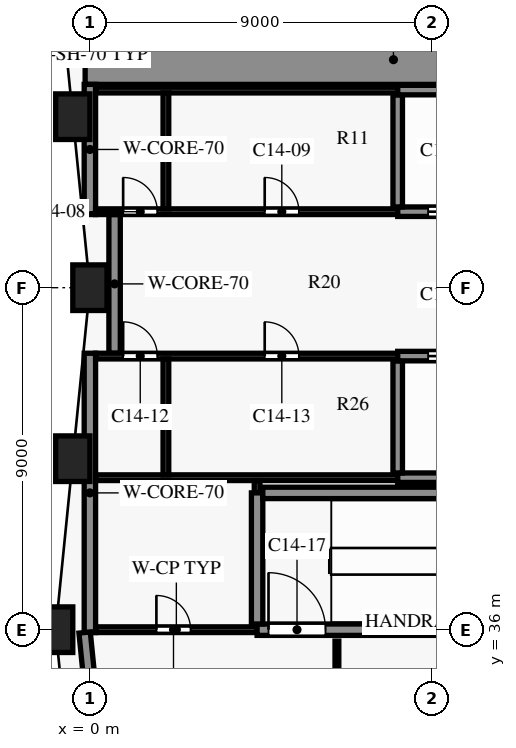
"""IFC4 building model, lengths in metres.
Left out: names, types, materials, properties, quantities, classifications, styles, units other than length and angle.
Written with IfcOpenShell. Run it as: python <this file> out.ifc"""

import sys

from ifc_helpers import new_model, si_unit, direction, frame, frame_2d, origin, origin_2d, place, context, subcontext, project, spatial, rectangle, extrude, element, fill, save


model = new_model("IFC4")
c1 = context("Model", 3, precision=1e-05, world=origin(), true_north=direction((0.0, 1.0)))
c2 = subcontext(c1, "Body", "Model", "MODEL_VIEW")
j1 = project(units=[si_unit("LENGTHUNIT", "METRE"), si_unit("PLANEANGLEUNIT", "RADIAN")], contexts=[c1])
p1 = place(None, origin())
s1 = spatial("IfcSite", under=j1, at=p1, CompositionType="ELEMENT")
p2 = place(p1, origin())
s2 = spatial("IfcBuilding", under=s1, at=p2, CompositionType="ELEMENT")
p3 = place(p2, frame((0.0, 0.0, 92.3)))
s3 = spatial("IfcBuildingStorey", under=s2, at=p3, CompositionType="ELEMENT", Elevation=92.3)
for number, where, z_axis, x_axis in (
    (1, (-0.45, 49.5, 0.0), (0.0, 0.0, 1.0), (0.1, -0.995, 0.0)),
    (2, (0.0, 45.0, 0.0), (0.0, 0.0, 1.0), (0.0, -1.0, 0.0)),
    (3, (-0.45, 40.5, 0.0), (0.0, 0.0, 1.0), (-0.1, -0.995, 0.0)),
    (4, (-0.9, 36.0, 0.0), (0.0, 0.0, 1.0), (0.0, -1.0, 0.0)),
):
    element("IfcColumn", number, at=place(p3, frame(where, z_axis=z_axis, x_axis=x_axis)), inside=s3, PredefinedType="COLUMN", context=c2, shape_type="SweptSolid", body=[
        extrude(rectangle(XDim=0.9, YDim=1.2, at=origin_2d()), origin(), (0.0, 0.0, 1.0), 3.8),
    ])
p4 = place(p3, frame((0.755, 26.985, 0.0), z_axis=(0.0, 0.0, 1.0), x_axis=(-0.099479505633, 0.995039611251, 0.0)))
e5 = element("IfcWall", 5, at=p4, inside=s3, PredefinedType="SOLIDWALL", context=c2, shape_type="SweptSolid", body=[
    extrude(rectangle(XDim=8.985, YDim=0.3, at=frame_2d((4.492, 0.0))), origin(), (0.0, 0.0, 1.0), 3.15),
])
p5 = place(p4, frame((0.701, 0.0, 0.15)))
e6 = element("IfcOpeningElement", 6, at=p5, cuts=e5, PredefinedType="OPENING", context=c2, shape_type="SweptSolid", body=[
    extrude(rectangle(XDim=3.3, YDim=2.4, at=frame_2d((1.65, 1.2))), frame((0.0, 0.16, 0.0), z_axis=(0.0, -1.0, 0.0), x_axis=(1.0, 0.0, 0.0)), (0.0, 0.0, 1.0), 0.32),
])
p6 = place(p4, frame((5.974, 0.0, 0.75)))
e7 = element("IfcOpeningElement", 7, at=p6, cuts=e5, PredefinedType="OPENING", context=c2, shape_type="SweptSolid", body=[
    extrude(rectangle(XDim=1.8, YDim=1.8, at=frame_2d((0.9, 0.9))), frame((0.0, 0.16, 0.0), z_axis=(0.0, -1.0, 0.0), x_axis=(1.0, 0.0, 0.0)), (0.0, 0.0, 1.0), 0.32),
])
p7 = place(p3, frame((0.15, 36.0, 0.0), z_axis=(0.0, 0.0, 1.0), x_axis=(1.0, 0.0, 0.0)))
e8 = element("IfcWall", 8, at=p7, inside=s3, PredefinedType="PARTITIONING", context=c2, shape_type="SweptSolid", body=[
    extrude(rectangle(XDim=4.25, YDim=0.15, at=frame_2d((2.125, 0.0))), origin(), (0.0, 0.0, 1.0), 3.5),
])
p8 = place(p7, frame((1.6, 0.0, 0.0)))
e9 = element("IfcOpeningElement", 9, at=p8, cuts=e8, PredefinedType="OPENING", context=c2, shape_type="SweptSolid", body=[
    extrude(rectangle(XDim=0.9, YDim=2.1, at=frame_2d((0.45, 1.05))), frame((0.0, 0.085, 0.0), z_axis=(0.0, -1.0, 0.0), x_axis=(1.0, 0.0, 0.0)), (0.0, 0.0, 1.0), 0.17),
])
p9 = place(p3, frame((4.4, 36.0, 0.0), z_axis=(0.0, 0.0, 1.0), x_axis=(1.0, 0.0, 0.0)))
e10 = element("IfcWall", 10, at=p9, inside=s3, PredefinedType="SHEAR", context=c2, shape_type="SweptSolid", body=[
    extrude(rectangle(XDim=8.0, YDim=0.3, at=frame_2d((4.0, 0.0))), origin(), (0.0, 0.0, 1.0), 3.5),
])
p10 = place(p9, frame((0.3, 0.0, 0.0)))
e11 = element("IfcOpeningElement", 11, at=p10, cuts=e10, PredefinedType="OPENING", context=c2, shape_type="SweptSolid", body=[
    extrude(rectangle(XDim=1.5, YDim=2.2, at=frame_2d((0.75, 1.1))), frame((0.0, 0.16, 0.0), z_axis=(0.0, -1.0, 0.0), x_axis=(1.0, 0.0, 0.0)), (0.0, 0.0, 1.0), 0.32),
])
p11 = place(p3, frame((4.55, 39.6, 0.0), z_axis=(0.0, 0.0, 1.0), x_axis=(1.0, 0.0, 0.0)))
e12 = element("IfcWall", 12, at=p11, inside=s3, PredefinedType="SHEAR", context=c2, shape_type="SweptSolid", body=[
    extrude(rectangle(XDim=7.7, YDim=0.3, at=frame_2d((3.85, 0.0))), origin(), (0.0, 0.0, 1.0), 3.5),
])
p12 = place(p3, frame((0.15, 40.0, 0.0), z_axis=(0.0, 0.0, 1.0), x_axis=(1.0, 0.0, 0.0)))
e13 = element("IfcWall", 13, at=p12, inside=s3, PredefinedType="PARTITIONING", context=c2, shape_type="SweptSolid", body=[
    extrude(rectangle(XDim=7.95, YDim=0.15, at=frame_2d((3.975, 0.0))), origin(), (0.0, 0.0, 1.0), 3.5),
])
p13 = place(p3, frame((8.1, 40.0, 0.0), z_axis=(0.0, 0.0, 1.0), x_axis=(1.0, 0.0, 0.0)))
e14 = element("IfcWall", 14, at=p13, inside=s3, PredefinedType="SHEAR", context=c2, shape_type="SweptSolid", body=[
    extrude(rectangle(XDim=13.5, YDim=0.25, at=frame_2d((6.75, 0.0))), origin(), (0.0, 0.0, 1.0), 3.5),
])
p14 = place(p3, frame((0.15, 43.2, 0.0), z_axis=(0.0, 0.0, 1.0), x_axis=(1.0, 0.0, 0.0)))
e15 = element("IfcWall", 15, at=p14, inside=s3, PredefinedType="PARTITIONING", context=c2, shape_type="SweptSolid", body=[
    extrude(rectangle(XDim=7.95, YDim=0.15, at=frame_2d((3.975, 0.0))), origin(), (0.0, 0.0, 1.0), 3.5),
])
p15 = place(p14, frame((0.725, 0.0, 0.0)))
e16 = element("IfcOpeningElement", 16, at=p15, cuts=e15, PredefinedType="OPENING", context=c2, shape_type="SweptSolid", body=[
    extrude(rectangle(XDim=0.9, YDim=2.1, at=frame_2d((0.45, 1.05))), frame((0.0, 0.085, 0.0), z_axis=(0.0, -1.0, 0.0), x_axis=(1.0, 0.0, 0.0)), (0.0, 0.0, 1.0), 0.17),
])
p16 = place(p14, frame((4.45, 0.0, 0.0)))
e17 = element("IfcOpeningElement", 17, at=p16, cuts=e15, PredefinedType="OPENING", context=c2, shape_type="SweptSolid", body=[
    extrude(rectangle(XDim=0.9, YDim=2.1, at=frame_2d((0.45, 1.05))), frame((0.0, 0.085, 0.0), z_axis=(0.0, -1.0, 0.0), x_axis=(1.0, 0.0, 0.0)), (0.0, 0.0, 1.0), 0.17),
])
p17 = place(p3, frame((8.1, 43.2, 0.0), z_axis=(0.0, 0.0, 1.0), x_axis=(1.0, 0.0, 0.0)))
e18 = element("IfcWall", 18, at=p17, inside=s3, PredefinedType="SHEAR", context=c2, shape_type="SweptSolid", body=[
    extrude(rectangle(XDim=13.5, YDim=0.25, at=frame_2d((6.75, 0.0))), origin(), (0.0, 0.0, 1.0), 3.5),
])
p18 = place(p17, frame((0.8, 0.0, 0.0)))
e19 = element("IfcOpeningElement", 19, at=p18, cuts=e18, PredefinedType="OPENING", context=c2, shape_type="SweptSolid", body=[
    extrude(rectangle(XDim=1.1, YDim=2.1, at=frame_2d((0.55, 1.05))), frame((0.0, 0.135, 0.0), z_axis=(0.0, -1.0, 0.0), x_axis=(1.0, 0.0, 0.0)), (0.0, 0.0, 1.0), 0.27),
])
p19 = place(p17, frame((3.5, 0.0, 0.0)))
e20 = element("IfcOpeningElement", 20, at=p19, cuts=e18, PredefinedType="OPENING", context=c2, shape_type="SweptSolid", body=[
    extrude(rectangle(XDim=1.1, YDim=2.1, at=frame_2d((0.55, 1.05))), frame((0.0, 0.135, 0.0), z_axis=(0.0, -1.0, 0.0), x_axis=(1.0, 0.0, 0.0)), (0.0, 0.0, 1.0), 0.27),
])
p20 = place(p17, frame((6.2, 0.0, 0.0)))
e21 = element("IfcOpeningElement", 21, at=p20, cuts=e18, PredefinedType="OPENING", context=c2, shape_type="SweptSolid", body=[
    extrude(rectangle(XDim=1.1, YDim=2.1, at=frame_2d((0.55, 1.05))), frame((0.0, 0.135, 0.0), z_axis=(0.0, -1.0, 0.0), x_axis=(1.0, 0.0, 0.0)), (0.0, 0.0, 1.0), 0.27),
])
p21 = place(p17, frame((8.9, 0.0, 0.0)))
e22 = element("IfcOpeningElement", 22, at=p21, cuts=e18, PredefinedType="OPENING", context=c2, shape_type="SweptSolid", body=[
    extrude(rectangle(XDim=1.1, YDim=2.1, at=frame_2d((0.55, 1.05))), frame((0.0, 0.135, 0.0), z_axis=(0.0, -1.0, 0.0), x_axis=(1.0, 0.0, 0.0)), (0.0, 0.0, 1.0), 0.27),
])
p22 = place(p17, frame((11.6, 0.0, 0.0)))
e23 = element("IfcOpeningElement", 23, at=p22, cuts=e18, PredefinedType="OPENING", context=c2, shape_type="SweptSolid", body=[
    extrude(rectangle(XDim=1.1, YDim=2.1, at=frame_2d((0.55, 1.05))), frame((0.0, 0.135, 0.0), z_axis=(0.0, -1.0, 0.0), x_axis=(1.0, 0.0, 0.0)), (0.0, 0.0, 1.0), 0.27),
])
p23 = place(p3, frame((0.15, 47.0, 0.0), z_axis=(0.0, 0.0, 1.0), x_axis=(1.0, 0.0, 0.0)))
e24 = element("IfcWall", 24, at=p23, inside=s3, PredefinedType="PARTITIONING", context=c2, shape_type="SweptSolid", body=[
    extrude(rectangle(XDim=7.95, YDim=0.15, at=frame_2d((3.975, 0.0))), origin(), (0.0, 0.0, 1.0), 3.5),
])
p24 = place(p23, frame((0.725, 0.0, 0.0)))
e25 = element("IfcOpeningElement", 25, at=p24, cuts=e24, PredefinedType="OPENING", context=c2, shape_type="SweptSolid", body=[
    extrude(rectangle(XDim=0.9, YDim=2.1, at=frame_2d((0.45, 1.05))), frame((0.0, 0.085, 0.0), z_axis=(0.0, -1.0, 0.0), x_axis=(1.0, 0.0, 0.0)), (0.0, 0.0, 1.0), 0.17),
])
p25 = place(p23, frame((4.45, 0.0, 0.0)))
e26 = element("IfcOpeningElement", 26, at=p25, cuts=e24, PredefinedType="OPENING", context=c2, shape_type="SweptSolid", body=[
    extrude(rectangle(XDim=0.9, YDim=2.1, at=frame_2d((0.45, 1.05))), frame((0.0, 0.085, 0.0), z_axis=(0.0, -1.0, 0.0), x_axis=(1.0, 0.0, 0.0)), (0.0, 0.0, 1.0), 0.17),
])
p26 = place(p3, frame((8.1, 47.0, 0.0), z_axis=(0.0, 0.0, 1.0), x_axis=(1.0, 0.0, 0.0)))
e27 = element("IfcWall", 27, at=p26, inside=s3, PredefinedType="SHEAR", context=c2, shape_type="SweptSolid", body=[
    extrude(rectangle(XDim=8.1, YDim=0.25, at=frame_2d((4.05, 0.0))), origin(), (0.0, 0.0, 1.0), 3.5),
])
p27 = place(p26, frame((0.8, 0.0, 0.0)))
e28 = element("IfcOpeningElement", 28, at=p27, cuts=e27, PredefinedType="OPENING", context=c2, shape_type="SweptSolid", body=[
    extrude(rectangle(XDim=1.1, YDim=2.1, at=frame_2d((0.55, 1.05))), frame((0.0, 0.135, 0.0), z_axis=(0.0, -1.0, 0.0), x_axis=(1.0, 0.0, 0.0)), (0.0, 0.0, 1.0), 0.27),
])
p28 = place(p26, frame((3.5, 0.0, 0.0)))
e29 = element("IfcOpeningElement", 29, at=p28, cuts=e27, PredefinedType="OPENING", context=c2, shape_type="SweptSolid", body=[
    extrude(rectangle(XDim=1.1, YDim=2.1, at=frame_2d((0.55, 1.05))), frame((0.0, 0.135, 0.0), z_axis=(0.0, -1.0, 0.0), x_axis=(1.0, 0.0, 0.0)), (0.0, 0.0, 1.0), 0.27),
])
p29 = place(p26, frame((6.2, 0.0, 0.0)))
e30 = element("IfcOpeningElement", 30, at=p29, cuts=e27, PredefinedType="OPENING", context=c2, shape_type="SweptSolid", body=[
    extrude(rectangle(XDim=1.1, YDim=2.1, at=frame_2d((0.55, 1.05))), frame((0.0, 0.135, 0.0), z_axis=(0.0, -1.0, 0.0), x_axis=(1.0, 0.0, 0.0)), (0.0, 0.0, 1.0), 0.27),
])
p30 = place(p3, frame((0.15, 50.2, 0.0), z_axis=(0.0, 0.0, 1.0), x_axis=(1.0, 0.0, 0.0)))
e31 = element("IfcWall", 31, at=p30, inside=s3, PredefinedType="PARTITIONING", context=c2, shape_type="SweptSolid", body=[
    extrude(rectangle(XDim=7.95, YDim=0.15, at=frame_2d((3.975, 0.0))), origin(), (0.0, 0.0, 1.0), 3.5),
])
p31 = place(p3, frame((8.1, 50.2, 0.0), z_axis=(0.0, 0.0, 1.0), x_axis=(1.0, 0.0, 0.0)))
e32 = element("IfcWall", 32, at=p31, inside=s3, PredefinedType="SHEAR", context=c2, shape_type="SweptSolid", body=[
    extrude(rectangle(XDim=7.975, YDim=0.25, at=frame_2d((3.987, 0.0))), origin(), (0.0, 0.0, 1.0), 3.5),
])
p32 = place(p3, frame((-0.125, 51.0, 0.0), z_axis=(0.0, 0.0, 1.0), x_axis=(1.0, 0.0, 0.0)))
e33 = element("IfcWall", 33, at=p32, inside=s3, PredefinedType="SHEAR", context=c2, shape_type="SweptSolid", body=[
    extrude(rectangle(XDim=16.225, YDim=1.3, at=frame_2d((8.113, 0.0))), origin(), (0.0, 0.0, 1.0), 3.5),
])
p33 = place(p3, frame((0.0, 35.925, 0.0), z_axis=(0.0, 0.0, 1.0), x_axis=(0.0, 1.0, 0.0)))
e34 = element("IfcWall", 34, at=p33, inside=s3, PredefinedType="SHEAR", context=c2, shape_type="SweptSolid", body=[
    extrude(rectangle(XDim=7.35, YDim=0.3, at=frame_2d((3.675, 0.0))), origin(), (0.0, 0.0, 1.0), 3.5),
])
p34 = place(p3, frame((0.0, 46.925, 0.0), z_axis=(0.0, 0.0, 1.0), x_axis=(0.0, 1.0, 0.0)))
e35 = element("IfcWall", 35, at=p34, inside=s3, PredefinedType="SHEAR", context=c2, shape_type="SweptSolid", body=[
    extrude(rectangle(XDim=3.425, YDim=0.3, at=frame_2d((1.712, 0.0))), origin(), (0.0, 0.0, 1.0), 3.5),
])
p35 = place(p3, frame((0.65, 43.275, 0.0), z_axis=(0.0, 0.0, 1.0), x_axis=(0.0, 1.0, 0.0)))
e36 = element("IfcWall", 36, at=p35, inside=s3, PredefinedType="SHEAR", context=c2, shape_type="SweptSolid", body=[
    extrude(rectangle(XDim=3.65, YDim=0.3, at=frame_2d((1.825, 0.0))), origin(), (0.0, 0.0, 1.0), 3.5),
])
for number, where, z_axis, x_axis in (
    (37, (2.0, 40.075, 0.0), (0.0, 0.0, 1.0), (0.0, 1.0, 0.0)),
    (38, (2.0, 47.075, 0.0), (0.0, 0.0, 1.0), (0.0, 1.0, 0.0)),
):
    element("IfcWall", number, at=place(p3, frame(where, z_axis=z_axis, x_axis=x_axis)), inside=s3, PredefinedType="PARTITIONING", context=c2, shape_type="SweptSolid", body=[
        extrude(rectangle(XDim=3.05, YDim=0.15, at=frame_2d((1.525, 0.0))), origin(), (0.0, 0.0, 1.0), 3.5),
    ])
p36 = place(p3, frame((4.4, 39.6, 0.0), z_axis=(0.0, 0.0, 1.0), x_axis=(0.0, 1.0, 0.0)))
e39 = element("IfcWall", 39, at=p36, inside=s3, PredefinedType="PARTITIONING", context=c2, shape_type="SweptSolid", body=[
    extrude(rectangle(XDim=0.325, YDim=0.15, at=frame_2d((0.163, 0.0))), origin(), (0.0, 0.0, 1.0), 3.5),
])
p37 = place(p3, frame((4.4, 36.15, 0.0), z_axis=(0.0, 0.0, 1.0), x_axis=(0.0, 1.0, 0.0)))
e40 = element("IfcWall", 40, at=p37, inside=s3, PredefinedType="SHEAR", context=c2, shape_type="SweptSolid", body=[
    extrude(rectangle(XDim=3.45, YDim=0.3, at=frame_2d((1.725, 0.0))), origin(), (0.0, 0.0, 1.0), 3.5),
])
for number, where, z_axis, x_axis in (
    (41, (8.1, 40.125, 0.0), (0.0, 0.0, 1.0), (0.0, 1.0, 0.0)),
    (42, (8.1, 47.125, 0.0), (0.0, 0.0, 1.0), (0.0, 1.0, 0.0)),
):
    element("IfcWall", number, at=place(p3, frame(where, z_axis=z_axis, x_axis=x_axis)), inside=s3, PredefinedType="SHEAR", context=c2, shape_type="SweptSolid", body=[
        extrude(rectangle(XDim=2.95, YDim=0.25, at=frame_2d((1.475, 0.0))), origin(), (0.0, 0.0, 1.0), 3.5),
    ])
p38 = place(p3, frame((6.5, 33.55, 0.0), z_axis=(0.0, 0.0, 1.0), x_axis=(0.0, 1.0, 0.0)))
e43 = element("IfcWall", 43, at=p38, inside=s3, PredefinedType="PARTITIONING", context=c2, shape_type="SweptSolid", body=[
    extrude(rectangle(XDim=2.15, YDim=0.1, at=frame_2d((1.075, 0.0))), origin(), (0.0, 0.0, 1.0), 3.48),
])
p39 = place(p8, origin())
e44 = element("IfcDoor", 44, at=p39, inside=s3, OperationType="SINGLE_SWING_LEFT", PredefinedType="DOOR", context=c2, shape_type="SweptSolid", body=[
    extrude(rectangle(XDim=0.9, YDim=2.1, at=frame_2d((0.45, 1.05))), frame((0.0, 0.025, 0.0), z_axis=(0.0, -1.0, 0.0), x_axis=(1.0, 0.0, 0.0)), (0.0, 0.0, 1.0), 0.05),
])
fill(e9, e44)
p40 = place(p24, origin())
e45 = element("IfcDoor", 45, at=p40, inside=s3, OperationType="SINGLE_SWING_RIGHT", PredefinedType="DOOR", context=c2, shape_type="SweptSolid", body=[
    extrude(rectangle(XDim=0.9, YDim=2.1, at=frame_2d((0.45, 1.05))), frame((0.0, 0.025, 0.0), z_axis=(0.0, -1.0, 0.0), x_axis=(1.0, 0.0, 0.0)), (0.0, 0.0, 1.0), 0.05),
])
fill(e25, e45)
p41 = place(p25, origin())
e46 = element("IfcDoor", 46, at=p41, inside=s3, OperationType="SINGLE_SWING_LEFT", PredefinedType="DOOR", context=c2, shape_type="SweptSolid", body=[
    extrude(rectangle(XDim=0.9, YDim=2.1, at=frame_2d((0.45, 1.05))), frame((0.0, 0.025, 0.0), z_axis=(0.0, -1.0, 0.0), x_axis=(1.0, 0.0, 0.0)), (0.0, 0.0, 1.0), 0.05),
])
fill(e26, e46)
p42 = place(p15, origin())
e47 = element("IfcDoor", 47, at=p42, inside=s3, OperationType="SINGLE_SWING_LEFT", PredefinedType="DOOR", context=c2, shape_type="SweptSolid", body=[
    extrude(rectangle(XDim=0.9, YDim=2.1, at=frame_2d((0.45, 1.05))), frame((0.0, 0.025, 0.0), z_axis=(0.0, -1.0, 0.0), x_axis=(1.0, 0.0, 0.0)), (0.0, 0.0, 1.0), 0.05),
])
fill(e16, e47)
p43 = place(p16, origin())
e48 = element("IfcDoor", 48, at=p43, inside=s3, OperationType="SINGLE_SWING_RIGHT", PredefinedType="DOOR", context=c2, shape_type="SweptSolid", body=[
    extrude(rectangle(XDim=0.9, YDim=2.1, at=frame_2d((0.45, 1.05))), frame((0.0, 0.025, 0.0), z_axis=(0.0, -1.0, 0.0), x_axis=(1.0, 0.0, 0.0)), (0.0, 0.0, 1.0), 0.05),
])
fill(e17, e48)
p44 = place(p10, origin())
e49 = element("IfcDoor", 49, at=p44, inside=s3, OperationType="SINGLE_SWING_RIGHT", PredefinedType="DOOR", context=c2, shape_type="SweptSolid", body=[
    extrude(rectangle(XDim=1.5, YDim=2.2, at=frame_2d((0.75, 1.1))), frame((0.0, 0.025, 0.0), z_axis=(0.0, -1.0, 0.0), x_axis=(1.0, 0.0, 0.0)), (0.0, 0.0, 1.0), 0.05),
])
fill(e11, e49)
p45 = place(p18, origin())
e50 = element("IfcDoor", 50, at=p45, inside=s3, OperationType="DOUBLE_DOOR_SLIDING", PredefinedType="DOOR", context=c2, shape_type="SweptSolid", body=[
    extrude(rectangle(XDim=1.1, YDim=2.1, at=frame_2d((0.55, 1.05))), frame((0.0, 0.025, 0.0), z_axis=(0.0, -1.0, 0.0), x_axis=(1.0, 0.0, 0.0)), (0.0, 0.0, 1.0), 0.05),
])
fill(e19, e50)
p46 = place(p27, origin())
e51 = element("IfcDoor", 51, at=p46, inside=s3, OperationType="DOUBLE_DOOR_SLIDING", PredefinedType="DOOR", context=c2, shape_type="SweptSolid", body=[
    extrude(rectangle(XDim=1.1, YDim=2.1, at=frame_2d((0.55, 1.05))), frame((0.0, 0.025, 0.0), z_axis=(0.0, -1.0, 0.0), x_axis=(1.0, 0.0, 0.0)), (0.0, 0.0, 1.0), 0.05),
])
fill(e28, e51)
save(model, sys.argv[1])
